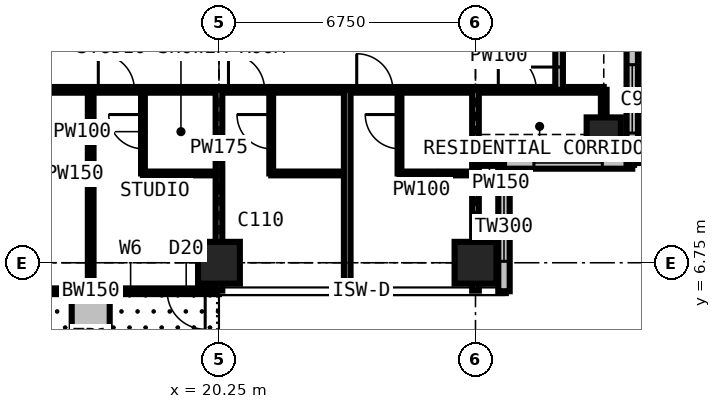
"""IFC4 building model, lengths in metres.
Left out: names, types, materials, properties, quantities, classifications, styles, units other than length and angle.
Written with IfcOpenShell. Run it as: python <this file> out.ifc"""

import sys

from ifc_helpers import new_model, si_unit, direction, frame, frame_2d, origin, origin_2d, place, context, subcontext, project, spatial, rectangle, extrude, element, fill, save


model = new_model("IFC4")
c1 = context("Model", 3, precision=1e-05, world=origin(), true_north=direction((0.0, 1.0)))
c2 = subcontext(c1, "Body", "Model", "MODEL_VIEW")
j1 = project(units=[si_unit("LENGTHUNIT", "METRE"), si_unit("PLANEANGLEUNIT", "RADIAN")], contexts=[c1])
p1 = place(None, origin())
s1 = spatial("IfcSite", under=j1, at=p1, CompositionType="ELEMENT")
p2 = place(p1, origin())
s2 = spatial("IfcBuilding", under=s1, at=p2, CompositionType="ELEMENT")
p3 = place(p2, frame((0.0, 0.0, 218.7)))
s3 = spatial("IfcBuildingStorey", under=s2, at=p3, CompositionType="ELEMENT", Elevation=218.7)
for number, where, z_axis, x_axis in (
    (1, (20.25, 6.75, 0.0), (0.0, 0.0, 1.0), (1.0, 0.0, 0.0)),
    (2, (27.0, 6.75, 0.0), (0.0, 0.0, 1.0), (1.0, 0.0, 0.0)),
):
    element("IfcColumn", number, at=place(p3, frame(where, z_axis=z_axis, x_axis=x_axis)), inside=s3, PredefinedType="COLUMN", context=c2, shape_type="SweptSolid", body=[
        extrude(rectangle(XDim=1.1, YDim=1.1, at=origin_2d()), origin(), (0.0, 0.0, 1.0), 3.6),
    ])
p4 = place(p3, frame((30.375, 10.125, 0.0), z_axis=(0.0, 0.0, 1.0), x_axis=(1.0, 0.0, 0.0)))
e3 = element("IfcColumn", 3, at=p4, inside=s3, PredefinedType="COLUMN", context=c2, shape_type="SweptSolid", body=[
    extrude(rectangle(XDim=0.9, YDim=0.9, at=origin_2d()), origin(), (0.0, 0.0, 1.0), 3.6),
])
p5 = place(p3, frame((20.25, 6.0, 0.0), z_axis=(0.0, 0.0, 1.0), x_axis=(-1.0, 0.0, 0.0)))
e4 = element("IfcWall", 4, at=p5, inside=s3, PredefinedType="SOLIDWALL", context=c2, shape_type="SweptSolid", body=[
    extrude(rectangle(XDim=6.75, YDim=0.15, at=frame_2d((3.375, 0.0))), origin(), (0.0, 0.0, 1.0), 3.375),
])
p6 = place(p5, frame((0.363, 0.0, 0.0)))
e5 = element("IfcOpeningElement", 5, at=p6, cuts=e4, PredefinedType="OPENING", context=c2, shape_type="SweptSolid", body=[
    extrude(rectangle(XDim=1.0, YDim=2.2, at=frame_2d((0.5, 1.1))), frame((0.0, 0.085, 0.0), z_axis=(0.0, -1.0, 0.0), x_axis=(1.0, 0.0, 0.0)), (0.0, 0.0, 1.0), 0.17),
])
p7 = place(p5, frame((1.725, 0.0, 0.9)))
e6 = element("IfcOpeningElement", 6, at=p7, cuts=e4, PredefinedType="OPENING", context=c2, shape_type="SweptSolid", body=[
    extrude(rectangle(XDim=1.2, YDim=1.8, at=frame_2d((0.6, 0.9))), frame((0.0, 0.085, 0.0), z_axis=(0.0, -1.0, 0.0), x_axis=(1.0, 0.0, 0.0)), (0.0, 0.0, 1.0), 0.17),
])
p8 = place(p5, frame((5.387, 0.0, 0.0)))
e7 = element("IfcOpeningElement", 7, at=p8, cuts=e4, PredefinedType="OPENING", context=c2, shape_type="SweptSolid", body=[
    extrude(rectangle(XDim=1.0, YDim=2.2, at=frame_2d((0.5, 1.1))), frame((0.0, 0.085, 0.0), z_axis=(0.0, -1.0, 0.0), x_axis=(1.0, 0.0, 0.0)), (0.0, 0.0, 1.0), 0.17),
])
p9 = place(p5, frame((3.825, 0.0, 0.9)))
e8 = element("IfcOpeningElement", 8, at=p9, cuts=e4, PredefinedType="OPENING", context=c2, shape_type="SweptSolid", body=[
    extrude(rectangle(XDim=1.2, YDim=1.8, at=frame_2d((0.6, 0.9))), frame((0.0, 0.085, 0.0), z_axis=(0.0, -1.0, 0.0), x_axis=(1.0, 0.0, 0.0)), (0.0, 0.0, 1.0), 0.17),
])
p10 = place(p3, frame((27.75, 6.0, 0.0), z_axis=(0.0, 0.0, 1.0), x_axis=(0.0, 1.0, 0.0)))
e9 = element("IfcWall", 9, at=p10, inside=s3, PredefinedType="SOLIDWALL", context=c2, shape_type="SweptSolid", body=[
    extrude(rectangle(XDim=3.375, YDim=0.3, at=frame_2d((1.688, 0.0))), origin(), (0.0, 0.0, 1.0), 3.375),
])
p11 = place(p10, frame((0.788, 0.0, 0.6)))
e10 = element("IfcOpeningElement", 10, at=p11, cuts=e9, PredefinedType="OPENING", context=c2, shape_type="SweptSolid", body=[
    extrude(rectangle(XDim=1.8, YDim=2.1, at=frame_2d((0.9, 1.05))), frame((0.0, 0.16, 0.0), z_axis=(0.0, -1.0, 0.0), x_axis=(1.0, 0.0, 0.0)), (0.0, 0.0, 1.0), 0.32),
])
p12 = place(p3, frame((27.75, 9.375, 0.0), z_axis=(0.0, 0.0, 1.0), x_axis=(1.0, 0.0, 0.0)))
e11 = element("IfcWall", 11, at=p12, inside=s3, PredefinedType="SOLIDWALL", context=c2, shape_type="SweptSolid", body=[
    extrude(rectangle(XDim=3.375, YDim=0.3, at=frame_2d((1.688, 0.0))), origin(), (0.0, 0.0, 1.0), 3.375),
])
p13 = place(p12, frame((0.788, 0.0, 0.6)))
e12 = element("IfcOpeningElement", 12, at=p13, cuts=e11, PredefinedType="OPENING", context=c2, shape_type="SweptSolid", body=[
    extrude(rectangle(XDim=1.8, YDim=2.1, at=frame_2d((0.9, 1.05))), frame((0.0, 0.16, 0.0), z_axis=(0.0, -1.0, 0.0), x_axis=(1.0, 0.0, 0.0)), (0.0, 0.0, 1.0), 0.32),
])
p14 = place(p3, frame((31.125, 9.375, 0.0), z_axis=(0.0, 0.0, 1.0), x_axis=(0.0, 1.0, 0.0)))
e13 = element("IfcWall", 13, at=p14, inside=s3, PredefinedType="SOLIDWALL", context=c2, shape_type="SweptSolid", body=[
    extrude(rectangle(XDim=3.375, YDim=0.3, at=frame_2d((1.688, 0.0))), origin(), (0.0, 0.0, 1.0), 3.375),
])
p15 = place(p14, frame((0.788, 0.0, 0.6)))
e14 = element("IfcOpeningElement", 14, at=p15, cuts=e13, PredefinedType="OPENING", context=c2, shape_type="SweptSolid", body=[
    extrude(rectangle(XDim=1.8, YDim=2.1, at=frame_2d((0.9, 1.05))), frame((0.0, 0.16, 0.0), z_axis=(0.0, -1.0, 0.0), x_axis=(1.0, 0.0, 0.0)), (0.0, 0.0, 1.0), 0.32),
])
p16 = place(p3, frame((16.875, 5.9, 0.0), z_axis=(0.0, 0.0, 1.0), x_axis=(0.0, -1.0, 0.0)))
e15 = element("IfcWall", 15, at=p16, inside=s3, PredefinedType="USERDEFINED", context=c2, shape_type="SweptSolid", body=[
    extrude(rectangle(XDim=2.2, YDim=1.0, at=frame_2d((1.1, 0.0))), origin(), (0.0, 0.0, 1.0), 0.9),
])
p17 = place(p3, frame((10.125, 11.3, 0.0), z_axis=(0.0, 0.0, 1.0), x_axis=(1.0, 0.0, 0.0)))
e16 = element("IfcWall", 16, at=p17, inside=s3, PredefinedType="PARTITIONING", context=c2, shape_type="SweptSolid", body=[
    extrude(rectangle(XDim=20.25, YDim=0.15, at=frame_2d((10.125, 0.0))), origin(), (0.0, 0.0, 1.0), 3.375),
])
p18 = place(p17, frame((6.95, 0.0, 0.0)))
e17 = element("IfcOpeningElement", 17, at=p18, cuts=e16, PredefinedType="OPENING", context=c2, shape_type="SweptSolid", body=[
    extrude(rectangle(XDim=0.95, YDim=2.2, at=frame_2d((0.475, 1.1))), frame((0.0, 0.085, 0.0), z_axis=(0.0, -1.0, 0.0), x_axis=(1.0, 0.0, 0.0)), (0.0, 0.0, 1.0), 0.17),
])
p19 = place(p17, frame((10.375, 0.0, 0.0)))
e18 = element("IfcOpeningElement", 18, at=p19, cuts=e16, PredefinedType="OPENING", context=c2, shape_type="SweptSolid", body=[
    extrude(rectangle(XDim=0.95, YDim=2.2, at=frame_2d((0.475, 1.1))), frame((0.0, 0.085, 0.0), z_axis=(0.0, -1.0, 0.0), x_axis=(1.0, 0.0, 0.0)), (0.0, 0.0, 1.0), 0.17),
])
p20 = place(p17, frame((13.75, 0.0, 0.0)))
e19 = element("IfcOpeningElement", 19, at=p20, cuts=e16, PredefinedType="OPENING", context=c2, shape_type="SweptSolid", body=[
    extrude(rectangle(XDim=0.95, YDim=2.2, at=frame_2d((0.475, 1.1))), frame((0.0, 0.085, 0.0), z_axis=(0.0, -1.0, 0.0), x_axis=(1.0, 0.0, 0.0)), (0.0, 0.0, 1.0), 0.17),
])
p21 = place(p17, frame((17.475, 0.0, 0.0)))
e20 = element("IfcOpeningElement", 20, at=p21, cuts=e16, PredefinedType="OPENING", context=c2, shape_type="SweptSolid", body=[
    extrude(rectangle(XDim=1.0, YDim=2.2, at=frame_2d((0.5, 1.1))), frame((0.0, 0.085, 0.0), z_axis=(0.0, -1.0, 0.0), x_axis=(1.0, 0.0, 0.0)), (0.0, 0.0, 1.0), 0.17),
])
p22 = place(p3, frame((16.875, 6.016, 0.0), z_axis=(0.0, 0.0, 1.0), x_axis=(0.0, 1.0, 0.0)))
e21 = element("IfcWall", 21, at=p22, inside=s3, PredefinedType="PARTITIONING", context=c2, shape_type="SweptSolid", body=[
    extrude(rectangle(XDim=5.284, YDim=0.15, at=frame_2d((2.642, 0.0))), origin(), (0.0, 0.0, 1.0), 3.375),
])
p23 = place(p3, frame((18.25, 9.1, 0.0), z_axis=(0.0, 0.0, 1.0), x_axis=(0.0, 1.0, 0.0)))
e22 = element("IfcWall", 22, at=p23, inside=s3, PredefinedType="PARTITIONING", context=c2, shape_type="SweptSolid", body=[
    extrude(rectangle(XDim=2.2, YDim=0.1, at=frame_2d((1.1, 0.0))), origin(), (0.0, 0.0, 1.0), 3.375),
])
p24 = place(p23, frame((0.65, 0.0, 0.0)))
e23 = element("IfcOpeningElement", 23, at=p24, cuts=e22, PredefinedType="OPENING", context=c2, shape_type="SweptSolid", body=[
    extrude(rectangle(XDim=0.9, YDim=2.2, at=frame_2d((0.45, 1.1))), frame((0.0, 0.06, 0.0), z_axis=(0.0, -1.0, 0.0), x_axis=(1.0, 0.0, 0.0)), (0.0, 0.0, 1.0), 0.12),
])
p25 = place(p3, frame((18.25, 9.1, 0.0), z_axis=(0.0, 0.0, 1.0), x_axis=(1.0, 0.0, 0.0)))
e24 = element("IfcWall", 24, at=p25, inside=s3, PredefinedType="PARTITIONING", context=c2, shape_type="SweptSolid", body=[
    extrude(rectangle(XDim=2.0, YDim=0.1, at=frame_2d((1.0, 0.0))), origin(), (0.0, 0.0, 1.0), 3.375),
])
p26 = place(p3, frame((20.25, 6.016, 0.0), z_axis=(0.0, 0.0, 1.0), x_axis=(0.0, 1.0, 0.0)))
e25 = element("IfcWall", 25, at=p26, inside=s3, PredefinedType="PARTITIONING", context=c2, shape_type="SweptSolid", body=[
    extrude(rectangle(XDim=5.284, YDim=0.175, at=frame_2d((2.642, 0.0))), origin(), (0.0, 0.0, 1.0), 2.877),
])
p27 = place(p3, frame((21.625, 9.1, 0.0), z_axis=(0.0, 0.0, 1.0), x_axis=(0.0, 1.0, 0.0)))
e26 = element("IfcWall", 26, at=p27, inside=s3, PredefinedType="PARTITIONING", context=c2, shape_type="SweptSolid", body=[
    extrude(rectangle(XDim=2.2, YDim=0.1, at=frame_2d((1.1, 0.0))), origin(), (0.0, 0.0, 1.0), 3.375),
])
p28 = place(p27, frame((0.65, 0.0, 0.0)))
e27 = element("IfcOpeningElement", 27, at=p28, cuts=e26, PredefinedType="OPENING", context=c2, shape_type="SweptSolid", body=[
    extrude(rectangle(XDim=0.9, YDim=2.2, at=frame_2d((0.45, 1.1))), frame((0.0, 0.06, 0.0), z_axis=(0.0, -1.0, 0.0), x_axis=(1.0, 0.0, 0.0)), (0.0, 0.0, 1.0), 0.12),
])
p29 = place(p3, frame((21.625, 9.1, 0.0), z_axis=(0.0, 0.0, 1.0), x_axis=(1.0, 0.0, 0.0)))
e28 = element("IfcWall", 28, at=p29, inside=s3, PredefinedType="PARTITIONING", context=c2, shape_type="SweptSolid", body=[
    extrude(rectangle(XDim=2.0, YDim=0.1, at=frame_2d((1.0, 0.0))), origin(), (0.0, 0.0, 1.0), 3.375),
])
p30 = place(p3, frame((23.625, 6.016, 0.0), z_axis=(0.0, 0.0, 1.0), x_axis=(0.0, 1.0, 0.0)))
e29 = element("IfcWall", 29, at=p30, inside=s3, PredefinedType="PARTITIONING", context=c2, shape_type="SweptSolid", body=[
    extrude(rectangle(XDim=5.284, YDim=0.175, at=frame_2d((2.642, 0.0))), origin(), (0.0, 0.0, 1.0), 3.375),
])
p31 = place(p3, frame((25.0, 9.1, 0.0), z_axis=(0.0, 0.0, 1.0), x_axis=(0.0, 1.0, 0.0)))
e30 = element("IfcWall", 30, at=p31, inside=s3, PredefinedType="PARTITIONING", context=c2, shape_type="SweptSolid", body=[
    extrude(rectangle(XDim=2.2, YDim=0.1, at=frame_2d((1.1, 0.0))), origin(), (0.0, 0.0, 1.0), 3.375),
])
p32 = place(p31, frame((0.65, 0.0, 0.0)))
e31 = element("IfcOpeningElement", 31, at=p32, cuts=e30, PredefinedType="OPENING", context=c2, shape_type="SweptSolid", body=[
    extrude(rectangle(XDim=0.9, YDim=2.2, at=frame_2d((0.45, 1.1))), frame((0.0, 0.06, 0.0), z_axis=(0.0, -1.0, 0.0), x_axis=(1.0, 0.0, 0.0)), (0.0, 0.0, 1.0), 0.12),
])
p33 = place(p3, frame((25.0, 9.1, 0.0), z_axis=(0.0, 0.0, 1.0), x_axis=(1.0, 0.0, 0.0)))
e32 = element("IfcWall", 32, at=p33, inside=s3, PredefinedType="PARTITIONING", context=c2, shape_type="SweptSolid", body=[
    extrude(rectangle(XDim=2.0, YDim=0.1, at=frame_2d((1.0, 0.0))), origin(), (0.0, 0.0, 1.0), 3.375),
])
p34 = place(p3, frame((27.0, 6.016, 0.0), z_axis=(0.0, 0.0, 1.0), x_axis=(0.0, 1.0, 0.0)))
e33 = element("IfcWall", 33, at=p34, inside=s3, PredefinedType="PARTITIONING", context=c2, shape_type="SweptSolid", body=[
    extrude(rectangle(XDim=5.284, YDim=0.175, at=frame_2d((2.642, 0.0))), origin(), (0.0, 0.0, 1.0), 2.877),
])
p35 = place(p3, frame((27.0, 9.375, 0.0), z_axis=(0.0, 0.0, 1.0), x_axis=(1.0, 0.0, 0.0)))
e34 = element("IfcWall", 34, at=p35, inside=s3, PredefinedType="PARTITIONING", context=c2, shape_type="SweptSolid", body=[
    extrude(rectangle(XDim=0.734, YDim=0.15, at=frame_2d((0.367, 0.0))), origin(), (0.0, 0.0, 1.0), 3.375),
])
p36 = place(p3, frame((29.2, 11.3, 0.0), z_axis=(0.0, 0.0, 1.0), x_axis=(0.0, 1.0, 0.0)))
e35 = element("IfcWall", 35, at=p36, inside=s3, PredefinedType="PARTITIONING", context=c2, shape_type="SweptSolid", body=[
    extrude(rectangle(XDim=17.9, YDim=0.2, at=frame_2d((8.95, 0.0))), origin(), (0.0, 0.0, 1.0), 3.375),
])
p37 = place(p36, frame((0.6, 0.0, 0.0)))
e36 = element("IfcOpeningElement", 36, at=p37, cuts=e35, PredefinedType="OPENING", context=c2, shape_type="SweptSolid", body=[
    extrude(rectangle(XDim=1.0, YDim=2.2, at=frame_2d((0.5, 1.1))), frame((0.0, 0.11, 0.0), z_axis=(0.0, -1.0, 0.0), x_axis=(1.0, 0.0, 0.0)), (0.0, 0.0, 1.0), 0.22),
])
p38 = place(p36, frame((2.4, 0.0, 0.0)))
e37 = element("IfcOpeningElement", 37, at=p38, cuts=e35, PredefinedType="OPENING", context=c2, shape_type="SweptSolid", body=[
    extrude(rectangle(XDim=0.95, YDim=2.2, at=frame_2d((0.475, 1.1))), frame((0.0, 0.11, 0.0), z_axis=(0.0, -1.0, 0.0), x_axis=(1.0, 0.0, 0.0)), (0.0, 0.0, 1.0), 0.22),
])
p39 = place(p36, frame((5.825, 0.0, 0.0)))
e38 = element("IfcOpeningElement", 38, at=p39, cuts=e35, PredefinedType="OPENING", context=c2, shape_type="SweptSolid", body=[
    extrude(rectangle(XDim=0.95, YDim=2.2, at=frame_2d((0.475, 1.1))), frame((0.0, 0.11, 0.0), z_axis=(0.0, -1.0, 0.0), x_axis=(1.0, 0.0, 0.0)), (0.0, 0.0, 1.0), 0.22),
])
p40 = place(p36, frame((9.2, 0.0, 0.0)))
e39 = element("IfcOpeningElement", 39, at=p40, cuts=e35, PredefinedType="OPENING", context=c2, shape_type="SweptSolid", body=[
    extrude(rectangle(XDim=0.95, YDim=2.2, at=frame_2d((0.475, 1.1))), frame((0.0, 0.11, 0.0), z_axis=(0.0, -1.0, 0.0), x_axis=(1.0, 0.0, 0.0)), (0.0, 0.0, 1.0), 0.22),
])
p41 = place(p36, frame((12.575, 0.0, 0.0)))
e40 = element("IfcOpeningElement", 40, at=p41, cuts=e35, PredefinedType="OPENING", context=c2, shape_type="SweptSolid", body=[
    extrude(rectangle(XDim=0.95, YDim=2.2, at=frame_2d((0.475, 1.1))), frame((0.0, 0.11, 0.0), z_axis=(0.0, -1.0, 0.0), x_axis=(1.0, 0.0, 0.0)), (0.0, 0.0, 1.0), 0.22),
])
p42 = place(p36, frame((16.3, 0.0, 0.0)))
e41 = element("IfcOpeningElement", 41, at=p42, cuts=e35, PredefinedType="OPENING", context=c2, shape_type="SweptSolid", body=[
    extrude(rectangle(XDim=1.0, YDim=2.2, at=frame_2d((0.5, 1.1))), frame((0.0, 0.11, 0.0), z_axis=(0.0, -1.0, 0.0), x_axis=(1.0, 0.0, 0.0)), (0.0, 0.0, 1.0), 0.22),
])
p43 = place(p3, frame((30.375, 9.525, 0.0), z_axis=(0.0, 0.0, 1.0), x_axis=(0.0, 1.0, 0.0)))
e42 = element("IfcWall", 42, at=p43, inside=s3, PredefinedType="PARTITIONING", context=c2, shape_type="SweptSolid", body=[
    extrude(rectangle(XDim=1.775, YDim=0.15, at=frame_2d((0.888, 0.0))), origin(), (0.0, 0.0, 1.0), 2.877),
])
p44 = place(p6, origin())
e43 = element("IfcDoor", 43, at=p44, inside=s3, OperationType="SINGLE_SWING_LEFT", PredefinedType="DOOR", context=c2, shape_type="SweptSolid", body=[
    extrude(rectangle(XDim=1.0, YDim=2.2, at=frame_2d((0.5, 1.1))), frame((0.0, 0.025, 0.0), z_axis=(0.0, -1.0, 0.0), x_axis=(1.0, 0.0, 0.0)), (0.0, 0.0, 1.0), 0.05),
])
fill(e5, e43)
p45 = place(p7, origin())
e44 = element("IfcWindow", 44, at=p45, inside=s3, PartitioningType="SINGLE_PANEL", PredefinedType="WINDOW", context=c2, shape_type="SweptSolid", body=[
    extrude(rectangle(XDim=1.2, YDim=1.8, at=frame_2d((0.6, 0.9))), frame((0.0, 0.03, 0.0), z_axis=(0.0, -1.0, 0.0), x_axis=(1.0, 0.0, 0.0)), (0.0, 0.0, 1.0), 0.06),
])
fill(e6, e44)
p46 = place(p9, origin())
e45 = element("IfcWindow", 45, at=p46, inside=s3, PartitioningType="SINGLE_PANEL", PredefinedType="WINDOW", context=c2, shape_type="SweptSolid", body=[
    extrude(rectangle(XDim=1.2, YDim=1.8, at=frame_2d((0.6, 0.9))), frame((0.0, 0.03, 0.0), z_axis=(0.0, -1.0, 0.0), x_axis=(1.0, 0.0, 0.0)), (0.0, 0.0, 1.0), 0.06),
])
fill(e8, e45)
p47 = place(p11, origin())
e46 = element("IfcWindow", 46, at=p47, inside=s3, PartitioningType="SINGLE_PANEL", PredefinedType="WINDOW", context=c2, shape_type="SweptSolid", body=[
    extrude(rectangle(XDim=1.8, YDim=2.1, at=frame_2d((0.9, 1.05))), frame((0.0, 0.03, 0.0), z_axis=(0.0, -1.0, 0.0), x_axis=(1.0, 0.0, 0.0)), (0.0, 0.0, 1.0), 0.06),
])
fill(e10, e46)
p48 = place(p13, origin())
e47 = element("IfcWindow", 47, at=p48, inside=s3, PartitioningType="SINGLE_PANEL", PredefinedType="WINDOW", context=c2, shape_type="SweptSolid", body=[
    extrude(rectangle(XDim=1.8, YDim=2.1, at=frame_2d((0.9, 1.05))), frame((0.0, 0.03, 0.0), z_axis=(0.0, -1.0, 0.0), x_axis=(1.0, 0.0, 0.0)), (0.0, 0.0, 1.0), 0.06),
])
fill(e12, e47)
p49 = place(p15, origin())
e48 = element("IfcWindow", 48, at=p49, inside=s3, PartitioningType="SINGLE_PANEL", PredefinedType="WINDOW", context=c2, shape_type="SweptSolid", body=[
    extrude(rectangle(XDim=1.8, YDim=2.1, at=frame_2d((0.9, 1.05))), frame((0.0, 0.03, 0.0), z_axis=(0.0, -1.0, 0.0), x_axis=(1.0, 0.0, 0.0)), (0.0, 0.0, 1.0), 0.06),
])
fill(e14, e48)
p50 = place(p18, origin())
e49 = element("IfcDoor", 49, at=p50, inside=s3, OperationType="SINGLE_SWING_LEFT", PredefinedType="DOOR", context=c2, shape_type="SweptSolid", body=[
    extrude(rectangle(XDim=0.95, YDim=2.2, at=frame_2d((0.475, 1.1))), frame((0.0, 0.025, 0.0), z_axis=(0.0, -1.0, 0.0), x_axis=(1.0, 0.0, 0.0)), (0.0, 0.0, 1.0), 0.05),
])
fill(e17, e49)
p51 = place(p24, origin())
e50 = element("IfcDoor", 50, at=p51, inside=s3, OperationType="SINGLE_SWING_RIGHT", PredefinedType="DOOR", context=c2, shape_type="SweptSolid", body=[
    extrude(rectangle(XDim=0.9, YDim=2.2, at=frame_2d((0.45, 1.1))), frame((0.0, 0.025, 0.0), z_axis=(0.0, -1.0, 0.0), x_axis=(1.0, 0.0, 0.0)), (0.0, 0.0, 1.0), 0.05),
])
fill(e23, e50)
p52 = place(p19, origin())
e51 = element("IfcDoor", 51, at=p52, inside=s3, OperationType="SINGLE_SWING_LEFT", PredefinedType="DOOR", context=c2, shape_type="SweptSolid", body=[
    extrude(rectangle(XDim=0.95, YDim=2.2, at=frame_2d((0.475, 1.1))), frame((0.0, 0.025, 0.0), z_axis=(0.0, -1.0, 0.0), x_axis=(1.0, 0.0, 0.0)), (0.0, 0.0, 1.0), 0.05),
])
fill(e18, e51)
p53 = place(p28, origin())
e52 = element("IfcDoor", 52, at=p53, inside=s3, OperationType="SINGLE_SWING_RIGHT", PredefinedType="DOOR", context=c2, shape_type="SweptSolid", body=[
    extrude(rectangle(XDim=0.9, YDim=2.2, at=frame_2d((0.45, 1.1))), frame((0.0, 0.025, 0.0), z_axis=(0.0, -1.0, 0.0), x_axis=(1.0, 0.0, 0.0)), (0.0, 0.0, 1.0), 0.05),
])
fill(e27, e52)
p54 = place(p20, origin())
e53 = element("IfcDoor", 53, at=p54, inside=s3, OperationType="SINGLE_SWING_LEFT", PredefinedType="DOOR", context=c2, shape_type="SweptSolid", body=[
    extrude(rectangle(XDim=0.95, YDim=2.2, at=frame_2d((0.475, 1.1))), frame((0.0, 0.025, 0.0), z_axis=(0.0, -1.0, 0.0), x_axis=(1.0, 0.0, 0.0)), (0.0, 0.0, 1.0), 0.05),
])
fill(e19, e53)
p55 = place(p32, origin())
e54 = element("IfcDoor", 54, at=p55, inside=s3, OperationType="SINGLE_SWING_RIGHT", PredefinedType="DOOR", context=c2, shape_type="SweptSolid", body=[
    extrude(rectangle(XDim=0.9, YDim=2.2, at=frame_2d((0.45, 1.1))), frame((0.0, 0.025, 0.0), z_axis=(0.0, -1.0, 0.0), x_axis=(1.0, 0.0, 0.0)), (0.0, 0.0, 1.0), 0.05),
])
fill(e31, e54)
p56 = place(p21, origin())
e55 = element("IfcDoor", 55, at=p56, inside=s3, OperationType="SINGLE_SWING_LEFT", PredefinedType="DOOR", context=c2, shape_type="SweptSolid", body=[
    extrude(rectangle(XDim=1.0, YDim=2.2, at=frame_2d((0.5, 1.1))), frame((0.0, 0.025, 0.0), z_axis=(0.0, -1.0, 0.0), x_axis=(1.0, 0.0, 0.0)), (0.0, 0.0, 1.0), 0.05),
])
fill(e20, e55)
p57 = place(p37, origin())
e56 = element("IfcDoor", 56, at=p57, inside=s3, OperationType="SINGLE_SWING_LEFT", PredefinedType="DOOR", context=c2, shape_type="SweptSolid", body=[
    extrude(rectangle(XDim=1.0, YDim=2.2, at=frame_2d((0.5, 1.1))), frame((0.0, 0.025, 0.0), z_axis=(0.0, -1.0, 0.0), x_axis=(1.0, 0.0, 0.0)), (0.0, 0.0, 1.0), 0.05),
])
fill(e36, e56)
save(model, sys.argv[1])
